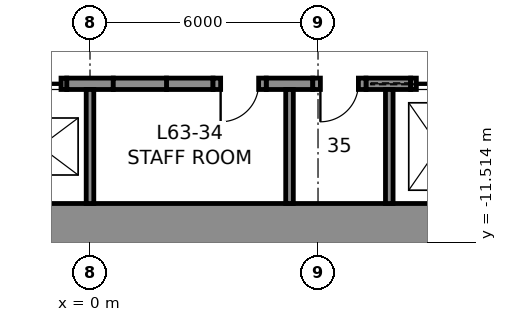
"""IFC4 building model, lengths in metres.
Left out: names, types, materials, properties, quantities, classifications, styles, units other than length and angle.
Written with IfcOpenShell. Run it as: python <this file> out.ifc"""

import sys

from ifc_helpers import new_model, si_unit, direction, frame, frame_2d, origin, place, context, subcontext, project, spatial, rectangle, extrude, element, fill, save


model = new_model("IFC4")
c1 = context("Model", 3, precision=1e-05, world=origin(), true_north=direction((0.0, 1.0)))
c2 = subcontext(c1, "Body", "Model", "MODEL_VIEW")
j1 = project(units=[si_unit("LENGTHUNIT", "METRE"), si_unit("PLANEANGLEUNIT", "RADIAN")], contexts=[c1])
p1 = place(None, origin())
s1 = spatial("IfcSite", under=j1, at=p1, CompositionType="ELEMENT")
p2 = place(p1, origin())
s2 = spatial("IfcBuilding", under=s1, at=p2, CompositionType="ELEMENT")
p3 = place(p2, frame((0.0, 0.0, 281.8)))
s3 = spatial("IfcBuildingStorey", under=s2, at=p3, CompositionType="ELEMENT", Elevation=281.8)
p4 = place(p3, frame((12.0, -11.25, 0.0), z_axis=(0.0, 0.0, 1.0), x_axis=(-1.0, 0.0, 0.0)))
e1 = element("IfcWall", 1, at=p4, inside=s3, PredefinedType="SHEAR", context=c2, shape_type="SweptSolid", body=[
    extrude(rectangle(XDim=24.0, YDim=1.5, at=frame_2d((12.0, 0.0))), origin(), (0.0, 0.0, 1.0), 4.0),
])
for number, where, z_axis, x_axis in (
    (2, (-0.613, -7.35, 0.0), (0.0, 0.0, 1.0), (1.0, 0.0, 0.0)),
    (3, (2.012, -7.35, 0.0), (0.0, 0.0, 1.0), (1.0, 0.0, 0.0)),
    (4, (4.637, -7.35, 0.0), (0.0, 0.0, 1.0), (1.0, 0.0, 0.0)),
):
    element("IfcWall", number, at=place(p3, frame(where, z_axis=z_axis, x_axis=x_axis)), inside=s3, PredefinedType="SHEAR", context=c2, shape_type="SweptSolid", body=[
        extrude(rectangle(XDim=1.225, YDim=0.3, at=frame_2d((0.613, 0.0))), origin(), (0.0, 0.0, 1.0), 4.0),
    ])
p5 = place(p3, frame((7.262, -7.35, 0.0), z_axis=(0.0, 0.0, 1.0), x_axis=(1.0, 0.0, 0.0)))
e5 = element("IfcWall", 5, at=p5, inside=s3, PredefinedType="SHEAR", context=c2, shape_type="SweptSolid", body=[
    extrude(rectangle(XDim=1.175, YDim=0.3, at=frame_2d((0.587, 0.0))), origin(), (0.0, 0.0, 1.0), 4.0),
])
p6 = place(p3, frame((-2.012, -7.35, 0.0), z_axis=(0.0, 0.0, 1.0), x_axis=(1.0, 0.0, 0.0)))
e6 = element("IfcWall", 6, at=p6, inside=s3, PredefinedType="PARTITIONING", context=c2, shape_type="SweptSolid", body=[
    extrude(rectangle(XDim=1.4, YDim=0.3, at=frame_2d((0.7, 0.0))), origin(), (0.0, 0.0, 1.0), 4.0),
])
p7 = place(p6, frame((0.15, 0.0, 0.0)))
e7 = element("IfcOpeningElement", 7, at=p7, cuts=e6, PredefinedType="OPENING", context=c2, shape_type="SweptSolid", body=[
    extrude(rectangle(XDim=1.1, YDim=2.3, at=frame_2d((0.55, 1.15))), frame((0.0, 0.16, 0.0), z_axis=(0.0, -1.0, 0.0), x_axis=(1.0, 0.0, 0.0)), (0.0, 0.0, 1.0), 0.32),
])
p8 = place(p3, frame((0.613, -7.35, 0.0), z_axis=(0.0, 0.0, 1.0), x_axis=(1.0, 0.0, 0.0)))
e8 = element("IfcWall", 8, at=p8, inside=s3, PredefinedType="PARTITIONING", context=c2, shape_type="SweptSolid", body=[
    extrude(rectangle(XDim=1.4, YDim=0.3, at=frame_2d((0.7, 0.0))), origin(), (0.0, 0.0, 1.0), 4.0),
])
p9 = place(p3, frame((3.238, -7.35, 0.0), z_axis=(0.0, 0.0, 1.0), x_axis=(1.0, 0.0, 0.0)))
e9 = element("IfcWall", 9, at=p9, inside=s3, PredefinedType="PARTITIONING", context=c2, shape_type="SweptSolid", body=[
    extrude(rectangle(XDim=1.4, YDim=0.3, at=frame_2d((0.7, 0.0))), origin(), (0.0, 0.0, 1.0), 4.0),
])
p10 = place(p9, frame((0.2, 0.0, 0.0)))
e10 = element("IfcOpeningElement", 10, at=p10, cuts=e9, PredefinedType="OPENING", context=c2, shape_type="SweptSolid", body=[
    extrude(rectangle(XDim=1.0, YDim=2.3, at=frame_2d((0.5, 1.15))), frame((0.0, 0.16, 0.0), z_axis=(0.0, -1.0, 0.0), x_axis=(1.0, 0.0, 0.0)), (0.0, 0.0, 1.0), 0.32),
])
p11 = place(p3, frame((5.863, -7.35, 0.0), z_axis=(0.0, 0.0, 1.0), x_axis=(1.0, 0.0, 0.0)))
e11 = element("IfcWall", 11, at=p11, inside=s3, PredefinedType="PARTITIONING", context=c2, shape_type="SweptSolid", body=[
    extrude(rectangle(XDim=1.4, YDim=0.3, at=frame_2d((0.7, 0.0))), origin(), (0.0, 0.0, 1.0), 4.0),
])
p12 = place(p11, frame((0.2, 0.0, 0.0)))
e12 = element("IfcOpeningElement", 12, at=p12, cuts=e11, PredefinedType="OPENING", context=c2, shape_type="SweptSolid", body=[
    extrude(rectangle(XDim=1.0, YDim=2.3, at=frame_2d((0.5, 1.15))), frame((0.0, 0.16, 0.0), z_axis=(0.0, -1.0, 0.0), x_axis=(1.0, 0.0, 0.0)), (0.0, 0.0, 1.0), 0.32),
])
p13 = place(p3, frame((8.438, -7.35, 0.0), z_axis=(0.0, 0.0, 1.0), x_axis=(1.0, 0.0, 0.0)))
e13 = element("IfcWall", 13, at=p13, inside=s3, PredefinedType="PARTITIONING", context=c2, shape_type="SweptSolid", body=[
    extrude(rectangle(XDim=1.5, YDim=0.3, at=frame_2d((0.75, 0.0))), origin(), (0.0, 0.0, 1.0), 4.0),
])
p14 = place(p13, frame((0.15, 0.0, 0.0)))
e14 = element("IfcOpeningElement", 14, at=p14, cuts=e13, PredefinedType="OPENING", context=c2, shape_type="SweptSolid", body=[
    extrude(rectangle(XDim=1.2, YDim=2.3, at=frame_2d((0.6, 1.15))), frame((0.0, 0.16, 0.0), z_axis=(0.0, -1.0, 0.0), x_axis=(1.0, 0.0, 0.0)), (0.0, 0.0, 1.0), 0.32),
])
for number, where, z_axis, x_axis in (
    (15, (0.0, -10.5, 0.0), (0.0, 0.0, 1.0), (0.0, 1.0, 0.0)),
    (16, (5.25, -10.5, 0.0), (0.0, 0.0, 1.0), (0.0, 1.0, 0.0)),
    (17, (7.875, -10.5, 0.0), (0.0, 0.0, 1.0), (0.0, 1.0, 0.0)),
):
    element("IfcWall", number, at=place(p3, frame(where, z_axis=z_axis, x_axis=x_axis)), inside=s3, PredefinedType="PARTITIONING", context=c2, shape_type="SweptSolid", body=[
        extrude(rectangle(XDim=3.0, YDim=0.2, at=frame_2d((1.5, 0.0))), origin(), (0.0, 0.0, 1.0), 4.0),
    ])
p15 = place(p10, frame((1.0, 0.0, 0.0), z_axis=(0.0, 0.0, 1.0), x_axis=(-1.0, 0.0, 0.0)))
e18 = element("IfcDoor", 18, at=p15, inside=s3, OperationType="SINGLE_SWING_RIGHT", PredefinedType="DOOR", context=c2, shape_type="SweptSolid", body=[
    extrude(rectangle(XDim=1.0, YDim=2.3, at=frame_2d((0.5, 1.15))), frame((0.0, 0.025, 0.0), z_axis=(0.0, -1.0, 0.0), x_axis=(1.0, 0.0, 0.0)), (0.0, 0.0, 1.0), 0.05),
])
fill(e10, e18)
p16 = place(p12, frame((1.0, 0.0, 0.0), z_axis=(0.0, 0.0, 1.0), x_axis=(-1.0, 0.0, 0.0)))
e19 = element("IfcDoor", 19, at=p16, inside=s3, OperationType="SINGLE_SWING_RIGHT", PredefinedType="DOOR", context=c2, shape_type="SweptSolid", body=[
    extrude(rectangle(XDim=1.0, YDim=2.3, at=frame_2d((0.5, 1.15))), frame((0.0, 0.025, 0.0), z_axis=(0.0, -1.0, 0.0), x_axis=(1.0, 0.0, 0.0)), (0.0, 0.0, 1.0), 0.05),
])
fill(e12, e19)
p17 = place(p14, origin())
e20 = element("IfcDoor", 20, at=p17, inside=s3, OperationType="SLIDING_TO_LEFT", PredefinedType="DOOR", context=c2, shape_type="SweptSolid", body=[
    extrude(rectangle(XDim=1.2, YDim=2.3, at=frame_2d((0.6, 1.15))), frame((0.0, 0.025, 0.0), z_axis=(0.0, -1.0, 0.0), x_axis=(1.0, 0.0, 0.0)), (0.0, 0.0, 1.0), 0.05),
])
fill(e14, e20)
p18 = place(p7, origin())
e21 = element("IfcDoor", 21, at=p18, inside=s3, OperationType="SLIDING_TO_LEFT", PredefinedType="DOOR", context=c2, shape_type="SweptSolid", body=[
    extrude(rectangle(XDim=1.1, YDim=2.3, at=frame_2d((0.55, 1.15))), frame((0.0, 0.025, 0.0), z_axis=(0.0, -1.0, 0.0), x_axis=(1.0, 0.0, 0.0)), (0.0, 0.0, 1.0), 0.05),
])
fill(e7, e21)
save(model, sys.argv[1])
